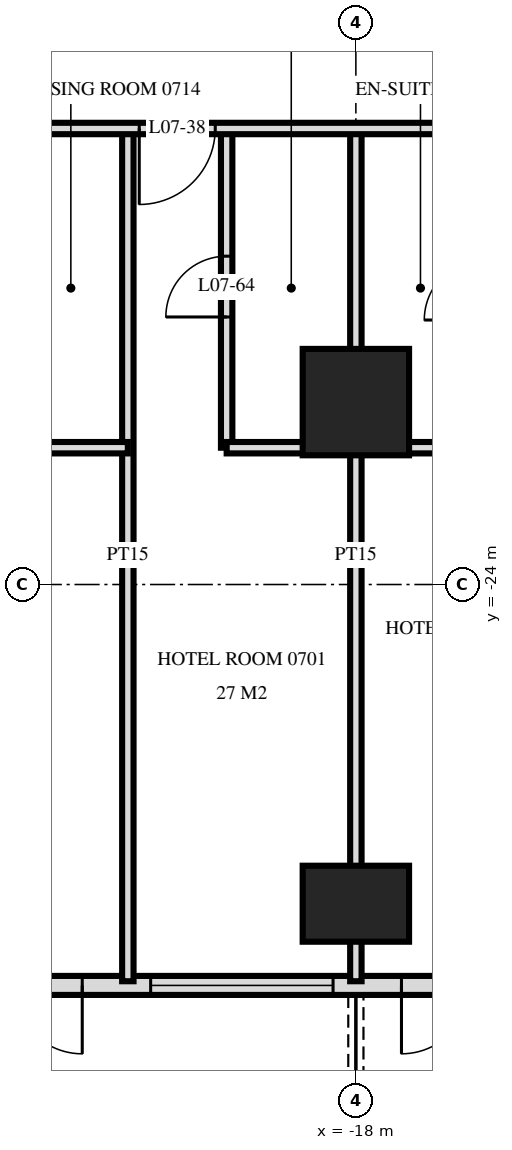
"""IFC4 building model, lengths in metres.
Left out: names, types, materials, properties, quantities, classifications, styles, units other than length and angle.
Written with IfcOpenShell. Run it as: python <this file> out.ifc"""

import sys

from ifc_helpers import new_model, si_unit, direction, frame, frame_2d, origin, origin_2d, place, context, subcontext, project, spatial, rectangle, extrude, element, fill, save


model = new_model("IFC4")
c1 = context("Model", 3, precision=1e-05, world=origin(), true_north=direction((0.0, 1.0)))
c2 = subcontext(c1, "Body", "Model", "MODEL_VIEW")
j1 = project(units=[si_unit("LENGTHUNIT", "METRE"), si_unit("PLANEANGLEUNIT", "RADIAN")], contexts=[c1])
p1 = place(None, origin())
s1 = spatial("IfcSite", under=j1, at=p1, CompositionType="ELEMENT")
p2 = place(p1, origin())
s2 = spatial("IfcBuilding", under=s1, at=p2, CompositionType="ELEMENT")
p3 = place(p2, frame((0.0, 0.0, 34.8)))
s3 = spatial("IfcBuildingStorey", under=s2, at=p3, CompositionType="ELEMENT", Elevation=34.8)
p4 = place(p3, frame((-18.0, -28.2, 0.0), z_axis=(0.0, 0.0, 1.0), x_axis=(1.0, 0.0, 0.0)))
e1 = element("IfcColumn", 1, at=p4, inside=s3, PredefinedType="COLUMN", context=c2, shape_type="SweptSolid", body=[
    extrude(rectangle(XDim=1.4, YDim=1.0, at=origin_2d()), origin(), (0.0, 0.0, 1.0), 3.6),
])
p5 = place(p3, frame((-18.0, -21.6, 0.0), z_axis=(0.0, 0.0, 1.0), x_axis=(1.0, 0.0, 0.0)))
e2 = element("IfcColumn", 2, at=p5, inside=s3, PredefinedType="COLUMN", context=c2, shape_type="SweptSolid", body=[
    extrude(rectangle(XDim=1.4, YDim=1.4, at=origin_2d()), origin(), (0.0, 0.0, 1.0), 3.6),
])
p6 = place(p3, frame((-28.775, -29.275, 0.0), z_axis=(0.0, 0.0, 1.0), x_axis=(1.0, 0.0, 0.0)))
e3 = element("IfcWall", 3, at=p6, inside=s3, PredefinedType="SOLIDWALL", context=c2, shape_type="SweptSolid", body=[
    extrude(rectangle(XDim=57.551, YDim=0.25, at=frame_2d((28.775, 0.0))), origin(), (0.0, 0.0, 1.0), 3.32),
])
p7 = place(p6, frame((0.575, 0.0, 0.0)))
e4 = element("IfcOpeningElement", 4, at=p7, cuts=e3, PredefinedType="OPENING", context=c2, shape_type="SweptSolid", body=[
    extrude(rectangle(XDim=1.8, YDim=2.4, at=frame_2d((0.9, 1.2))), frame((0.0, 0.135, 0.0), z_axis=(0.0, -1.0, 0.0), x_axis=(1.0, 0.0, 0.0)), (0.0, 0.0, 1.0), 0.27),
])
p8 = place(p6, frame((5.375, 0.0, 0.0)))
e5 = element("IfcOpeningElement", 5, at=p8, cuts=e3, PredefinedType="OPENING", context=c2, shape_type="SweptSolid", body=[
    extrude(rectangle(XDim=1.8, YDim=2.4, at=frame_2d((0.9, 1.2))), frame((0.0, 0.135, 0.0), z_axis=(0.0, -1.0, 0.0), x_axis=(1.0, 0.0, 0.0)), (0.0, 0.0, 1.0), 0.27),
])
p9 = place(p6, frame((8.075, 0.0, 0.3)))
e6 = element("IfcOpeningElement", 6, at=p9, cuts=e3, PredefinedType="OPENING", context=c2, shape_type="SweptSolid", body=[
    extrude(rectangle(XDim=2.4, YDim=2.1, at=frame_2d((1.2, 1.05))), frame((0.0, 0.135, 0.0), z_axis=(0.0, -1.0, 0.0), x_axis=(1.0, 0.0, 0.0)), (0.0, 0.0, 1.0), 0.27),
])
p10 = place(p6, frame((11.375, 0.0, 0.0)))
e7 = element("IfcOpeningElement", 7, at=p10, cuts=e3, PredefinedType="OPENING", context=c2, shape_type="SweptSolid", body=[
    extrude(rectangle(XDim=1.8, YDim=2.4, at=frame_2d((0.9, 1.2))), frame((0.0, 0.135, 0.0), z_axis=(0.0, -1.0, 0.0), x_axis=(1.0, 0.0, 0.0)), (0.0, 0.0, 1.0), 0.27),
])
p11 = place(p6, frame((14.075, 0.0, 0.3)))
e8 = element("IfcOpeningElement", 8, at=p11, cuts=e3, PredefinedType="OPENING", context=c2, shape_type="SweptSolid", body=[
    extrude(rectangle(XDim=2.4, YDim=2.1, at=frame_2d((1.2, 1.05))), frame((0.0, 0.135, 0.0), z_axis=(0.0, -1.0, 0.0), x_axis=(1.0, 0.0, 0.0)), (0.0, 0.0, 1.0), 0.27),
])
p12 = place(p6, frame((17.375, 0.0, 0.0)))
e9 = element("IfcOpeningElement", 9, at=p12, cuts=e3, PredefinedType="OPENING", context=c2, shape_type="SweptSolid", body=[
    extrude(rectangle(XDim=1.8, YDim=2.4, at=frame_2d((0.9, 1.2))), frame((0.0, 0.135, 0.0), z_axis=(0.0, -1.0, 0.0), x_axis=(1.0, 0.0, 0.0)), (0.0, 0.0, 1.0), 0.27),
])
p13 = place(p6, frame((20.075, 0.0, 0.3)))
e10 = element("IfcOpeningElement", 10, at=p13, cuts=e3, PredefinedType="OPENING", context=c2, shape_type="SweptSolid", body=[
    extrude(rectangle(XDim=2.4, YDim=2.1, at=frame_2d((1.2, 1.05))), frame((0.0, 0.135, 0.0), z_axis=(0.0, -1.0, 0.0), x_axis=(1.0, 0.0, 0.0)), (0.0, 0.0, 1.0), 0.27),
])
p14 = place(p6, frame((23.075, 0.0, 0.3)))
e11 = element("IfcOpeningElement", 11, at=p14, cuts=e3, PredefinedType="OPENING", context=c2, shape_type="SweptSolid", body=[
    extrude(rectangle(XDim=2.4, YDim=2.1, at=frame_2d((1.2, 1.05))), frame((0.0, 0.135, 0.0), z_axis=(0.0, -1.0, 0.0), x_axis=(1.0, 0.0, 0.0)), (0.0, 0.0, 1.0), 0.27),
])
p15 = place(p6, frame((26.375, 0.0, 0.0)))
e12 = element("IfcOpeningElement", 12, at=p15, cuts=e3, PredefinedType="OPENING", context=c2, shape_type="SweptSolid", body=[
    extrude(rectangle(XDim=1.8, YDim=2.4, at=frame_2d((0.9, 1.2))), frame((0.0, 0.135, 0.0), z_axis=(0.0, -1.0, 0.0), x_axis=(1.0, 0.0, 0.0)), (0.0, 0.0, 1.0), 0.27),
])
p16 = place(p6, frame((29.375, 0.0, 0.0)))
e13 = element("IfcOpeningElement", 13, at=p16, cuts=e3, PredefinedType="OPENING", context=c2, shape_type="SweptSolid", body=[
    extrude(rectangle(XDim=1.8, YDim=2.4, at=frame_2d((0.9, 1.2))), frame((0.0, 0.135, 0.0), z_axis=(0.0, -1.0, 0.0), x_axis=(1.0, 0.0, 0.0)), (0.0, 0.0, 1.0), 0.27),
])
p17 = place(p6, frame((32.075, 0.0, 0.3)))
e14 = element("IfcOpeningElement", 14, at=p17, cuts=e3, PredefinedType="OPENING", context=c2, shape_type="SweptSolid", body=[
    extrude(rectangle(XDim=2.4, YDim=2.1, at=frame_2d((1.2, 1.05))), frame((0.0, 0.135, 0.0), z_axis=(0.0, -1.0, 0.0), x_axis=(1.0, 0.0, 0.0)), (0.0, 0.0, 1.0), 0.27),
])
p18 = place(p6, frame((35.375, 0.0, 0.0)))
e15 = element("IfcOpeningElement", 15, at=p18, cuts=e3, PredefinedType="OPENING", context=c2, shape_type="SweptSolid", body=[
    extrude(rectangle(XDim=1.8, YDim=2.4, at=frame_2d((0.9, 1.2))), frame((0.0, 0.135, 0.0), z_axis=(0.0, -1.0, 0.0), x_axis=(1.0, 0.0, 0.0)), (0.0, 0.0, 1.0), 0.27),
])
p19 = place(p6, frame((38.075, 0.0, 0.3)))
e16 = element("IfcOpeningElement", 16, at=p19, cuts=e3, PredefinedType="OPENING", context=c2, shape_type="SweptSolid", body=[
    extrude(rectangle(XDim=2.4, YDim=2.1, at=frame_2d((1.2, 1.05))), frame((0.0, 0.135, 0.0), z_axis=(0.0, -1.0, 0.0), x_axis=(1.0, 0.0, 0.0)), (0.0, 0.0, 1.0), 0.27),
])
p20 = place(p6, frame((41.375, 0.0, 0.0)))
e17 = element("IfcOpeningElement", 17, at=p20, cuts=e3, PredefinedType="OPENING", context=c2, shape_type="SweptSolid", body=[
    extrude(rectangle(XDim=1.8, YDim=2.4, at=frame_2d((0.9, 1.2))), frame((0.0, 0.135, 0.0), z_axis=(0.0, -1.0, 0.0), x_axis=(1.0, 0.0, 0.0)), (0.0, 0.0, 1.0), 0.27),
])
p21 = place(p6, frame((44.075, 0.0, 0.3)))
e18 = element("IfcOpeningElement", 18, at=p21, cuts=e3, PredefinedType="OPENING", context=c2, shape_type="SweptSolid", body=[
    extrude(rectangle(XDim=2.4, YDim=2.1, at=frame_2d((1.2, 1.05))), frame((0.0, 0.135, 0.0), z_axis=(0.0, -1.0, 0.0), x_axis=(1.0, 0.0, 0.0)), (0.0, 0.0, 1.0), 0.27),
])
p22 = place(p6, frame((47.375, 0.0, 0.0)))
e19 = element("IfcOpeningElement", 19, at=p22, cuts=e3, PredefinedType="OPENING", context=c2, shape_type="SweptSolid", body=[
    extrude(rectangle(XDim=1.8, YDim=2.4, at=frame_2d((0.9, 1.2))), frame((0.0, 0.135, 0.0), z_axis=(0.0, -1.0, 0.0), x_axis=(1.0, 0.0, 0.0)), (0.0, 0.0, 1.0), 0.27),
])
p23 = place(p6, frame((50.075, 0.0, 0.3)))
e20 = element("IfcOpeningElement", 20, at=p23, cuts=e3, PredefinedType="OPENING", context=c2, shape_type="SweptSolid", body=[
    extrude(rectangle(XDim=2.4, YDim=2.1, at=frame_2d((1.2, 1.05))), frame((0.0, 0.135, 0.0), z_axis=(0.0, -1.0, 0.0), x_axis=(1.0, 0.0, 0.0)), (0.0, 0.0, 1.0), 0.27),
])
p24 = place(p6, frame((53.375, 0.0, 0.0)))
e21 = element("IfcOpeningElement", 21, at=p24, cuts=e3, PredefinedType="OPENING", context=c2, shape_type="SweptSolid", body=[
    extrude(rectangle(XDim=1.8, YDim=2.4, at=frame_2d((0.9, 1.2))), frame((0.0, 0.135, 0.0), z_axis=(0.0, -1.0, 0.0), x_axis=(1.0, 0.0, 0.0)), (0.0, 0.0, 1.0), 0.27),
])
p25 = place(p3, frame((-18.0, -29.22, 0.0), z_axis=(0.0, 0.0, 1.0), x_axis=(0.0, 1.0, 0.0)))
e22 = element("IfcWall", 22, at=p25, inside=s3, PredefinedType="PARTITIONING", context=c2, shape_type="SweptSolid", body=[
    extrude(rectangle(XDim=11.22, YDim=0.15, at=frame_2d((5.61, 0.0))), origin(), (0.0, 0.0, 1.0), 3.32),
])
p26 = place(p3, frame((-19.7, -22.2, 0.0), z_axis=(0.0, 0.0, 1.0), x_axis=(0.0, 1.0, 0.0)))
e23 = element("IfcWall", 23, at=p26, inside=s3, PredefinedType="PARTITIONING", context=c2, shape_type="SweptSolid", body=[
    extrude(rectangle(XDim=4.2, YDim=0.15, at=frame_2d((2.1, 0.0))), origin(), (0.0, 0.0, 1.0), 3.32),
])
p27 = place(p26, frame((1.72, 0.0, 0.0)))
e24 = element("IfcOpeningElement", 24, at=p27, cuts=e23, PredefinedType="OPENING", context=c2, shape_type="SweptSolid", body=[
    extrude(rectangle(XDim=0.8, YDim=2.1, at=frame_2d((0.4, 1.05))), frame((0.0, 0.085, 0.0), z_axis=(0.0, -1.0, 0.0), x_axis=(1.0, 0.0, 0.0)), (0.0, 0.0, 1.0), 0.17),
])
p28 = place(p3, frame((-21.0, -29.22, 0.0), z_axis=(0.0, 0.0, 1.0), x_axis=(0.0, 1.0, 0.0)))
e25 = element("IfcWall", 25, at=p28, inside=s3, PredefinedType="PARTITIONING", context=c2, shape_type="SweptSolid", body=[
    extrude(rectangle(XDim=11.22, YDim=0.15, at=frame_2d((5.61, 0.0))), origin(), (0.0, 0.0, 1.0), 3.32),
])
p29 = place(p3, frame((-22.5, -22.2, 0.0), z_axis=(0.0, 0.0, 1.0), x_axis=(1.0, 0.0, 0.0)))
e26 = element("IfcWall", 26, at=p29, inside=s3, PredefinedType="PARTITIONING", context=c2, shape_type="SweptSolid", body=[
    extrude(rectangle(XDim=1.5, YDim=0.15, at=frame_2d((0.75, 0.0))), origin(), (0.0, 0.0, 1.0), 3.32),
])
p30 = place(p3, frame((-19.7, -22.2, 0.0), z_axis=(0.0, 0.0, 1.0), x_axis=(1.0, 0.0, 0.0)))
e27 = element("IfcWall", 27, at=p30, inside=s3, PredefinedType="PARTITIONING", context=c2, shape_type="SweptSolid", body=[
    extrude(rectangle(XDim=3.4, YDim=0.15, at=frame_2d((1.7, 0.0))), origin(), (0.0, 0.0, 1.0), 3.32),
])
p31 = place(p3, frame((-33.12, -18.0, 0.0), z_axis=(0.0, 0.0, 1.0), x_axis=(1.0, 0.0, 0.0)))
e28 = element("IfcWall", 28, at=p31, inside=s3, PredefinedType="PARTITIONING", context=c2, shape_type="SweptSolid", body=[
    extrude(rectangle(XDim=66.24, YDim=0.15, at=frame_2d((33.12, 0.0))), origin(), (0.0, 0.0, 1.0), 3.32),
])
p32 = place(p31, frame((12.27, 0.0, 0.0)))
e29 = element("IfcOpeningElement", 29, at=p32, cuts=e28, PredefinedType="OPENING", context=c2, shape_type="SweptSolid", body=[
    extrude(rectangle(XDim=1.0, YDim=2.1, at=frame_2d((0.5, 1.05))), frame((0.0, 0.085, 0.0), z_axis=(0.0, -1.0, 0.0), x_axis=(1.0, 0.0, 0.0)), (0.0, 0.0, 1.0), 0.17),
])
p33 = place(p31, frame((16.97, 0.0, 0.0)))
e30 = element("IfcOpeningElement", 30, at=p33, cuts=e28, PredefinedType="OPENING", context=c2, shape_type="SweptSolid", body=[
    extrude(rectangle(XDim=1.0, YDim=2.1, at=frame_2d((0.5, 1.05))), frame((0.0, 0.085, 0.0), z_axis=(0.0, -1.0, 0.0), x_axis=(1.0, 0.0, 0.0)), (0.0, 0.0, 1.0), 0.17),
])
p34 = place(p31, frame((18.27, 0.0, 0.0)))
e31 = element("IfcOpeningElement", 31, at=p34, cuts=e28, PredefinedType="OPENING", context=c2, shape_type="SweptSolid", body=[
    extrude(rectangle(XDim=1.0, YDim=2.1, at=frame_2d((0.5, 1.05))), frame((0.0, 0.085, 0.0), z_axis=(0.0, -1.0, 0.0), x_axis=(1.0, 0.0, 0.0)), (0.0, 0.0, 1.0), 0.17),
])
p35 = place(p31, frame((22.97, 0.0, 0.0)))
e32 = element("IfcOpeningElement", 32, at=p35, cuts=e28, PredefinedType="OPENING", context=c2, shape_type="SweptSolid", body=[
    extrude(rectangle(XDim=1.0, YDim=2.1, at=frame_2d((0.5, 1.05))), frame((0.0, 0.085, 0.0), z_axis=(0.0, -1.0, 0.0), x_axis=(1.0, 0.0, 0.0)), (0.0, 0.0, 1.0), 0.17),
])
p36 = place(p31, frame((24.27, 0.0, 0.0)))
e33 = element("IfcOpeningElement", 33, at=p36, cuts=e28, PredefinedType="OPENING", context=c2, shape_type="SweptSolid", body=[
    extrude(rectangle(XDim=1.0, YDim=2.1, at=frame_2d((0.5, 1.05))), frame((0.0, 0.085, 0.0), z_axis=(0.0, -1.0, 0.0), x_axis=(1.0, 0.0, 0.0)), (0.0, 0.0, 1.0), 0.17),
])
p37 = place(p31, frame((28.97, 0.0, 0.0)))
e34 = element("IfcOpeningElement", 34, at=p37, cuts=e28, PredefinedType="OPENING", context=c2, shape_type="SweptSolid", body=[
    extrude(rectangle(XDim=1.0, YDim=2.1, at=frame_2d((0.5, 1.05))), frame((0.0, 0.085, 0.0), z_axis=(0.0, -1.0, 0.0), x_axis=(1.0, 0.0, 0.0)), (0.0, 0.0, 1.0), 0.17),
])
p38 = place(p31, frame((30.27, 0.0, 0.0)))
e35 = element("IfcOpeningElement", 35, at=p38, cuts=e28, PredefinedType="OPENING", context=c2, shape_type="SweptSolid", body=[
    extrude(rectangle(XDim=1.0, YDim=2.1, at=frame_2d((0.5, 1.05))), frame((0.0, 0.085, 0.0), z_axis=(0.0, -1.0, 0.0), x_axis=(1.0, 0.0, 0.0)), (0.0, 0.0, 1.0), 0.17),
])
p39 = place(p31, frame((34.97, 0.0, 0.0)))
e36 = element("IfcOpeningElement", 36, at=p39, cuts=e28, PredefinedType="OPENING", context=c2, shape_type="SweptSolid", body=[
    extrude(rectangle(XDim=1.0, YDim=2.1, at=frame_2d((0.5, 1.05))), frame((0.0, 0.085, 0.0), z_axis=(0.0, -1.0, 0.0), x_axis=(1.0, 0.0, 0.0)), (0.0, 0.0, 1.0), 0.17),
])
p40 = place(p31, frame((37.27, 0.0, 0.0)))
e37 = element("IfcOpeningElement", 37, at=p40, cuts=e28, PredefinedType="OPENING", context=c2, shape_type="SweptSolid", body=[
    extrude(rectangle(XDim=1.0, YDim=2.1, at=frame_2d((0.5, 1.05))), frame((0.0, 0.085, 0.0), z_axis=(0.0, -1.0, 0.0), x_axis=(1.0, 0.0, 0.0)), (0.0, 0.0, 1.0), 0.17),
])
p41 = place(p31, frame((43.97, 0.0, 0.0)))
e38 = element("IfcOpeningElement", 38, at=p41, cuts=e28, PredefinedType="OPENING", context=c2, shape_type="SweptSolid", body=[
    extrude(rectangle(XDim=1.0, YDim=2.1, at=frame_2d((0.5, 1.05))), frame((0.0, 0.085, 0.0), z_axis=(0.0, -1.0, 0.0), x_axis=(1.0, 0.0, 0.0)), (0.0, 0.0, 1.0), 0.17),
])
p42 = place(p31, frame((45.27, 0.0, 0.0)))
e39 = element("IfcOpeningElement", 39, at=p42, cuts=e28, PredefinedType="OPENING", context=c2, shape_type="SweptSolid", body=[
    extrude(rectangle(XDim=1.0, YDim=2.1, at=frame_2d((0.5, 1.05))), frame((0.0, 0.085, 0.0), z_axis=(0.0, -1.0, 0.0), x_axis=(1.0, 0.0, 0.0)), (0.0, 0.0, 1.0), 0.17),
])
p43 = place(p31, frame((51.22, 0.0, 0.0)))
e40 = element("IfcOpeningElement", 40, at=p43, cuts=e28, PredefinedType="OPENING", context=c2, shape_type="SweptSolid", body=[
    extrude(rectangle(XDim=1.0, YDim=2.1, at=frame_2d((0.5, 1.05))), frame((0.0, 0.085, 0.0), z_axis=(0.0, -1.0, 0.0), x_axis=(1.0, 0.0, 0.0)), (0.0, 0.0, 1.0), 0.17),
])
p44 = place(p31, frame((54.27, 0.0, 0.0)))
e41 = element("IfcOpeningElement", 41, at=p44, cuts=e28, PredefinedType="OPENING", context=c2, shape_type="SweptSolid", body=[
    extrude(rectangle(XDim=1.0, YDim=2.1, at=frame_2d((0.5, 1.05))), frame((0.0, 0.085, 0.0), z_axis=(0.0, -1.0, 0.0), x_axis=(1.0, 0.0, 0.0)), (0.0, 0.0, 1.0), 0.17),
])
p45 = place(p31, frame((6.07, 0.0, 0.0)))
e42 = element("IfcOpeningElement", 42, at=p45, cuts=e28, PredefinedType="OPENING", context=c2, shape_type="SweptSolid", body=[
    extrude(rectangle(XDim=1.0, YDim=2.1, at=frame_2d((0.5, 1.05))), frame((0.0, 0.085, 0.0), z_axis=(0.0, -1.0, 0.0), x_axis=(1.0, 0.0, 0.0)), (0.0, 0.0, 1.0), 0.17),
])
p46 = place(p31, frame((63.37, 0.0, 0.0)))
e43 = element("IfcOpeningElement", 43, at=p46, cuts=e28, PredefinedType="OPENING", context=c2, shape_type="SweptSolid", body=[
    extrude(rectangle(XDim=1.0, YDim=2.1, at=frame_2d((0.5, 1.05))), frame((0.0, 0.085, 0.0), z_axis=(0.0, -1.0, 0.0), x_axis=(1.0, 0.0, 0.0)), (0.0, 0.0, 1.0), 0.17),
])
p47 = place(p8, frame((0.9, 0.0, 0.0), z_axis=(0.0, 0.0, 1.0), x_axis=(-1.0, 0.0, 0.0)))
e44 = element("IfcDoor", 44, at=p47, inside=s3, OperationType="DOUBLE_DOOR_SINGLE_SWING", PredefinedType="DOOR", context=c2, shape_type="SweptSolid", body=[
    extrude(rectangle(XDim=1.8, YDim=2.4, at=frame_2d((0.0, 1.2))), frame((0.0, -0.025, 0.0), z_axis=(0.0, 1.0, 0.0), x_axis=(-1.0, 0.0, 0.0)), (0.0, 0.0, 1.0), 0.05),
])
fill(e5, e44)
p48 = place(p9, origin())
e45 = element("IfcWindow", 45, at=p48, inside=s3, PartitioningType="SINGLE_PANEL", PredefinedType="WINDOW", context=c2, shape_type="SweptSolid", body=[
    extrude(rectangle(XDim=2.4, YDim=2.1, at=frame_2d((1.2, 1.05))), frame((0.0, 0.03, 0.0), z_axis=(0.0, -1.0, 0.0), x_axis=(1.0, 0.0, 0.0)), (0.0, 0.0, 1.0), 0.06),
])
fill(e6, e45)
p49 = place(p10, frame((0.9, 0.0, 0.0), z_axis=(0.0, 0.0, 1.0), x_axis=(-1.0, 0.0, 0.0)))
e46 = element("IfcDoor", 46, at=p49, inside=s3, OperationType="DOUBLE_DOOR_SINGLE_SWING", PredefinedType="DOOR", context=c2, shape_type="SweptSolid", body=[
    extrude(rectangle(XDim=1.8, YDim=2.4, at=frame_2d((0.0, 1.2))), frame((0.0, -0.025, 0.0), z_axis=(0.0, 1.0, 0.0), x_axis=(-1.0, 0.0, 0.0)), (0.0, 0.0, 1.0), 0.05),
])
fill(e7, e46)
p50 = place(p32, frame((0.5, 0.0, 0.0), z_axis=(0.0, 0.0, 1.0), x_axis=(-1.0, 0.0, 0.0)))
e47 = element("IfcDoor", 47, at=p50, inside=s3, OperationType="SINGLE_SWING_LEFT", PredefinedType="DOOR", context=c2, shape_type="SweptSolid", body=[
    extrude(rectangle(XDim=1.0, YDim=2.1, at=frame_2d((0.0, 1.05))), frame((0.0, -0.025, 0.0), z_axis=(0.0, 1.0, 0.0), x_axis=(-1.0, 0.0, 0.0)), (0.0, 0.0, 1.0), 0.05),
])
fill(e29, e47)
p51 = place(p27, origin())
e48 = element("IfcDoor", 48, at=p51, inside=s3, OperationType="SINGLE_SWING_RIGHT", PredefinedType="DOOR", context=c2, shape_type="SweptSolid", body=[
    extrude(rectangle(XDim=0.8, YDim=2.1, at=frame_2d((0.4, 1.05))), frame((0.0, 0.025, 0.0), z_axis=(0.0, -1.0, 0.0), x_axis=(1.0, 0.0, 0.0)), (0.0, 0.0, 1.0), 0.05),
])
fill(e24, e48)
save(model, sys.argv[1])
